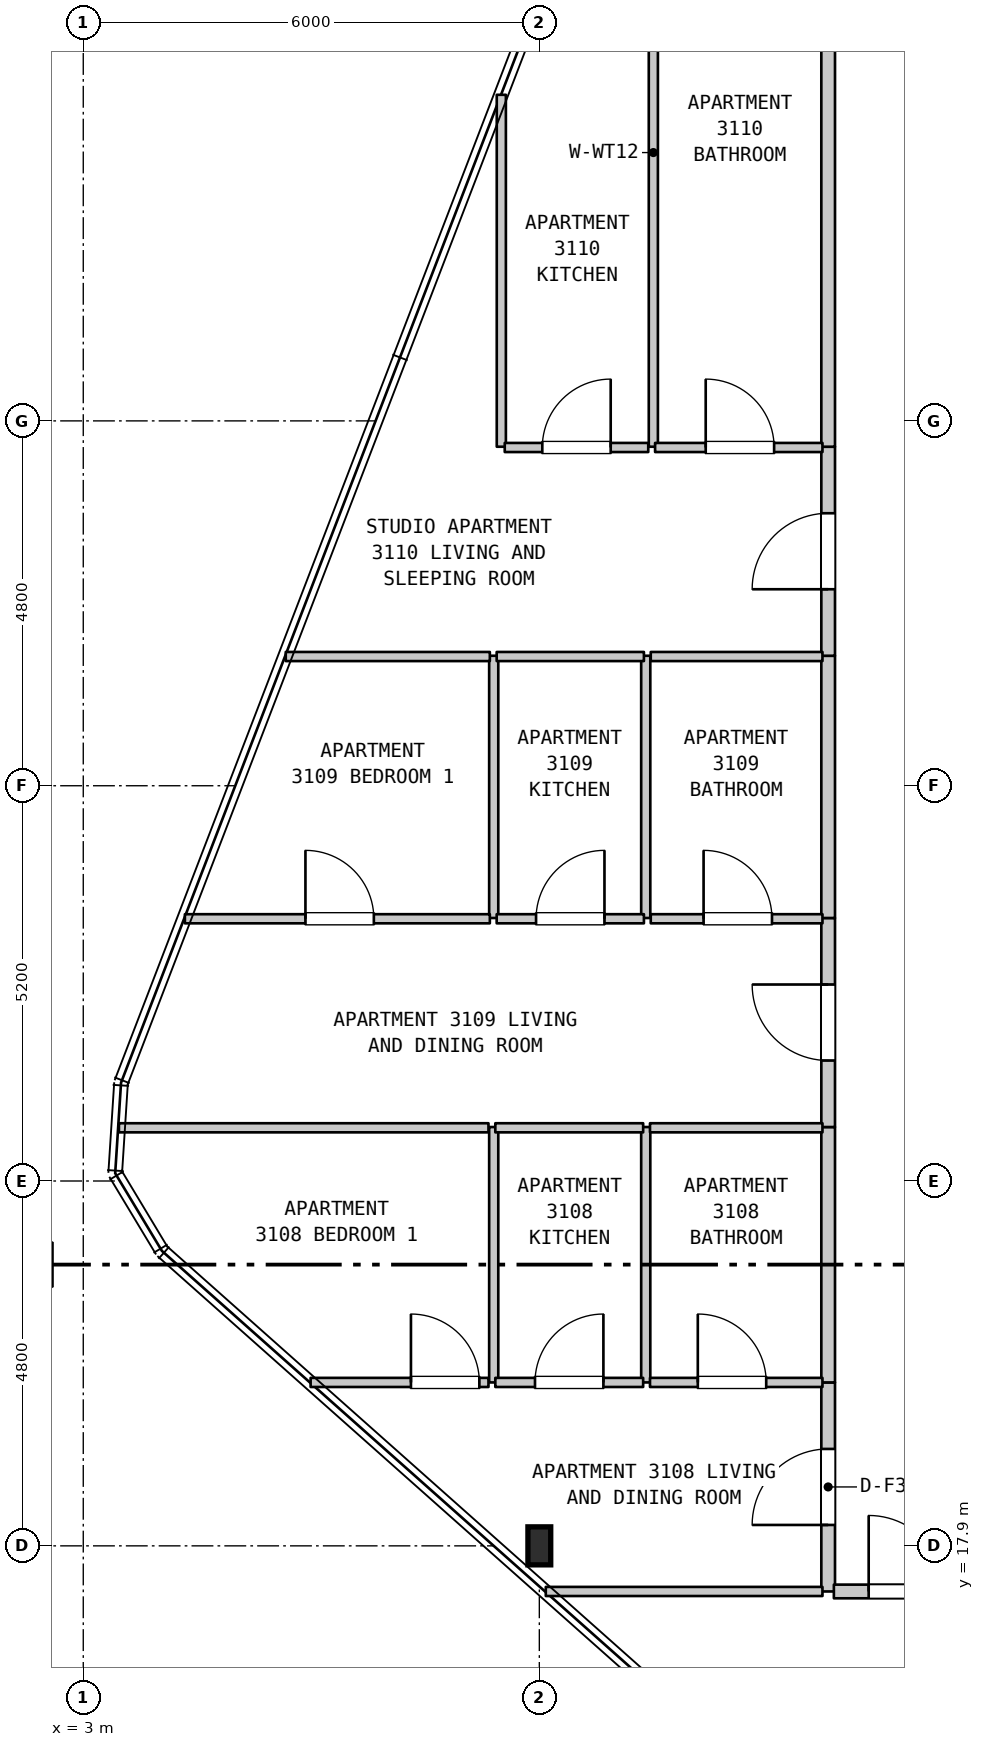
"""IFC4 building model, lengths in metres.
Left out: names, types, materials, properties, quantities, classifications, styles, units other than length and angle.
Written with IfcOpenShell. Run it as: python <this file> out.ifc"""

import sys

from ifc_helpers import new_model, si_unit, direction, frame, frame_2d, origin, origin_2d, place, context, subcontext, project, spatial, rectangle, i_section, extrude, element, fill, save


model = new_model("IFC4")
c1 = context("Model", 3, precision=1e-05, world=origin(), true_north=direction((0.0, 1.0)))
c2 = subcontext(c1, "Body", "Model", "MODEL_VIEW")
j1 = project(units=[si_unit("LENGTHUNIT", "METRE"), si_unit("PLANEANGLEUNIT", "RADIAN")], contexts=[c1])
p1 = place(None, origin())
s1 = spatial("IfcSite", under=j1, at=p1, CompositionType="ELEMENT")
p2 = place(p1, origin())
s2 = spatial("IfcBuilding", under=s1, at=p2, CompositionType="ELEMENT")
p3 = place(p2, frame((0.0, 0.0, 129.8)))
s3 = spatial("IfcBuildingStorey", under=s2, at=p3, CompositionType="ELEMENT", Elevation=129.8)
p4 = place(p3, frame((9.0, 17.9, 0.0), z_axis=(0.0, 0.0, 1.0), x_axis=(1.0, 0.0, 0.0)))
e1 = element("IfcColumn", 1, at=p4, inside=s3, PredefinedType="COLUMN", context=c2, shape_type="SweptSolid", body=[
    extrude(i_section(OverallWidth=0.3, OverallDepth=0.5, WebThickness=0.014, FlangeThickness=0.028, FilletRadius=0.027, at=origin_2d()), origin(), (0.0, 0.0, 1.0), 3.7),
])
p5 = place(p3, frame((8.4, 20.05, 0.0), z_axis=(0.0, 0.0, 1.0), x_axis=(0.0, 1.0, 0.0)))
e2 = element("IfcWall", 2, at=p5, inside=s3, PredefinedType="PARTITIONING", context=c2, shape_type="SweptSolid", body=[
    extrude(rectangle(XDim=3.36, YDim=0.12, at=frame_2d((1.68, 0.0))), origin(), (0.0, 0.0, 1.0), 3.385),
])
p6 = place(p3, frame((8.4, 26.16, 0.0), z_axis=(0.0, 0.0, 1.0), x_axis=(0.0, 1.0, 0.0)))
e3 = element("IfcWall", 3, at=p6, inside=s3, PredefinedType="PARTITIONING", context=c2, shape_type="SweptSolid", body=[
    extrude(rectangle(XDim=3.45, YDim=0.12, at=frame_2d((1.725, 0.0))), origin(), (0.0, 0.0, 1.0), 3.385),
])
p7 = place(p3, frame((8.5, 32.36, 0.0), z_axis=(0.0, 0.0, 1.0), x_axis=(0.0, 1.0, 0.0)))
e4 = element("IfcWall", 4, at=p7, inside=s3, PredefinedType="PARTITIONING", context=c2, shape_type="SweptSolid", body=[
    extrude(rectangle(XDim=4.63, YDim=0.12, at=frame_2d((2.315, 0.0))), origin(), (0.0, 0.0, 1.0), 3.385),
])
p8 = place(p3, frame((10.4, 20.05, 0.0), z_axis=(0.0, 0.0, 1.0), x_axis=(0.0, 1.0, 0.0)))
e5 = element("IfcWall", 5, at=p8, inside=s3, PredefinedType="PARTITIONING", context=c2, shape_type="SweptSolid", body=[
    extrude(rectangle(XDim=3.36, YDim=0.12, at=frame_2d((1.68, 0.0))), origin(), (0.0, 0.0, 1.0), 3.385),
])
p9 = place(p3, frame((10.4, 26.16, 0.0), z_axis=(0.0, 0.0, 1.0), x_axis=(0.0, 1.0, 0.0)))
e6 = element("IfcWall", 6, at=p9, inside=s3, PredefinedType="PARTITIONING", context=c2, shape_type="SweptSolid", body=[
    extrude(rectangle(XDim=3.45, YDim=0.12, at=frame_2d((1.725, 0.0))), origin(), (0.0, 0.0, 1.0), 3.385),
])
p10 = place(p3, frame((10.5, 32.36, 0.0), z_axis=(0.0, 0.0, 1.0), x_axis=(0.0, 1.0, 0.0)))
e7 = element("IfcWall", 7, at=p10, inside=s3, PredefinedType="PARTITIONING", context=c2, shape_type="SweptSolid", body=[
    extrude(rectangle(XDim=7.74, YDim=0.12, at=frame_2d((3.87, 0.0))), origin(), (0.0, 0.0, 1.0), 3.385),
])
p11 = place(p3, frame((12.8, 17.3, 0.0), z_axis=(0.0, 0.0, 1.0), x_axis=(0.0, 1.0, 0.0)))
e8 = element("IfcWall", 8, at=p11, inside=s3, PredefinedType="STANDARD", context=c2, shape_type="SweptSolid", body=[
    extrude(rectangle(XDim=2.75, YDim=0.18, at=frame_2d((1.375, 0.0))), origin(), (0.0, 0.0, 1.0), 3.385),
])
p12 = place(p11, frame((0.875, 0.0, 0.0)))
e9 = element("IfcOpeningElement", 9, at=p12, cuts=e8, PredefinedType="OPENING", context=c2, shape_type="SweptSolid", body=[
    extrude(rectangle(XDim=1.0, YDim=2.15, at=frame_2d((0.5, 1.075))), frame((0.0, 0.1, 0.0), z_axis=(0.0, -1.0, 0.0), x_axis=(1.0, 0.0, 0.0)), (0.0, 0.0, 1.0), 0.2),
])
p13 = place(p3, frame((12.8, 20.05, 0.0), z_axis=(0.0, 0.0, 1.0), x_axis=(0.0, 1.0, 0.0)))
e10 = element("IfcWall", 10, at=p13, inside=s3, PredefinedType="STANDARD", context=c2, shape_type="SweptSolid", body=[
    extrude(rectangle(XDim=3.36, YDim=0.18, at=frame_2d((1.68, 0.0))), origin(), (0.0, 0.0, 1.0), 3.385),
])
p14 = place(p3, frame((12.8, 23.41, 0.0), z_axis=(0.0, 0.0, 1.0), x_axis=(0.0, 1.0, 0.0)))
e11 = element("IfcWall", 11, at=p14, inside=s3, PredefinedType="STANDARD", context=c2, shape_type="SweptSolid", body=[
    extrude(rectangle(XDim=2.75, YDim=0.18, at=frame_2d((1.375, 0.0))), origin(), (0.0, 0.0, 1.0), 3.385),
])
p15 = place(p14, frame((0.875, 0.0, 0.0)))
e12 = element("IfcOpeningElement", 12, at=p15, cuts=e11, PredefinedType="OPENING", context=c2, shape_type="SweptSolid", body=[
    extrude(rectangle(XDim=1.0, YDim=2.15, at=frame_2d((0.5, 1.075))), frame((0.0, 0.1, 0.0), z_axis=(0.0, -1.0, 0.0), x_axis=(1.0, 0.0, 0.0)), (0.0, 0.0, 1.0), 0.2),
])
p16 = place(p3, frame((12.8, 26.16, 0.0), z_axis=(0.0, 0.0, 1.0), x_axis=(0.0, 1.0, 0.0)))
e13 = element("IfcWall", 13, at=p16, inside=s3, PredefinedType="STANDARD", context=c2, shape_type="SweptSolid", body=[
    extrude(rectangle(XDim=3.45, YDim=0.18, at=frame_2d((1.725, 0.0))), origin(), (0.0, 0.0, 1.0), 3.385),
])
p17 = place(p3, frame((12.8, 29.61, 0.0), z_axis=(0.0, 0.0, 1.0), x_axis=(0.0, 1.0, 0.0)))
e14 = element("IfcWall", 14, at=p17, inside=s3, PredefinedType="STANDARD", context=c2, shape_type="SweptSolid", body=[
    extrude(rectangle(XDim=2.75, YDim=0.18, at=frame_2d((1.375, 0.0))), origin(), (0.0, 0.0, 1.0), 3.385),
])
p18 = place(p17, frame((0.875, 0.0, 0.0)))
e15 = element("IfcOpeningElement", 15, at=p18, cuts=e14, PredefinedType="OPENING", context=c2, shape_type="SweptSolid", body=[
    extrude(rectangle(XDim=1.0, YDim=2.15, at=frame_2d((0.5, 1.075))), frame((0.0, 0.1, 0.0), z_axis=(0.0, -1.0, 0.0), x_axis=(1.0, 0.0, 0.0)), (0.0, 0.0, 1.0), 0.2),
])
p19 = place(p3, frame((12.8, 32.36, 0.0), z_axis=(0.0, 0.0, 1.0), x_axis=(0.0, 1.0, 0.0)))
e16 = element("IfcWall", 16, at=p19, inside=s3, PredefinedType="STANDARD", context=c2, shape_type="SweptSolid", body=[
    extrude(rectangle(XDim=7.74, YDim=0.18, at=frame_2d((3.87, 0.0))), origin(), (0.0, 0.0, 1.0), 3.385),
])
p20 = place(p3, frame((9.085, 17.3, 0.0), z_axis=(0.0, 0.0, 1.0), x_axis=(1.0, 0.0, 0.0)))
e17 = element("IfcWall", 17, at=p20, inside=s3, PredefinedType="PARTITIONING", context=c2, shape_type="SweptSolid", body=[
    extrude(rectangle(XDim=3.64, YDim=0.12, at=frame_2d((1.82, 0.0))), origin(), (0.0, 0.0, 1.0), 3.385),
])
p21 = place(p3, frame((12.875, 17.3, 0.0), z_axis=(0.0, 0.0, 1.0), x_axis=(1.0, 0.0, 0.0)))
e18 = element("IfcWall", 18, at=p21, inside=s3, PredefinedType="STANDARD", context=c2, shape_type="SweptSolid", body=[
    extrude(rectangle(XDim=3.78, YDim=0.18, at=frame_2d((1.89, 0.0))), origin(), (0.0, 0.0, 1.0), 3.385),
])
p22 = place(p21, frame((0.458, 0.0, 0.0)))
e19 = element("IfcOpeningElement", 19, at=p22, cuts=e18, PredefinedType="OPENING", context=c2, shape_type="SweptSolid", body=[
    extrude(rectangle(XDim=1.0, YDim=2.15, at=frame_2d((0.5, 1.075))), frame((0.0, 0.1, 0.0), z_axis=(0.0, -1.0, 0.0), x_axis=(1.0, 0.0, 0.0)), (0.0, 0.0, 1.0), 0.2),
])
p23 = place(p3, frame((5.991, 20.05, 0.0), z_axis=(0.0, 0.0, 1.0), x_axis=(1.0, 0.0, 0.0)))
e20 = element("IfcWall", 20, at=p23, inside=s3, PredefinedType="PARTITIONING", context=c2, shape_type="SweptSolid", body=[
    extrude(rectangle(XDim=2.34, YDim=0.12, at=frame_2d((1.17, 0.0))), origin(), (0.0, 0.0, 1.0), 3.385),
])
p24 = place(p23, frame((1.32, 0.0, 0.0)))
e21 = element("IfcOpeningElement", 21, at=p24, cuts=e20, PredefinedType="OPENING", context=c2, shape_type="SweptSolid", body=[
    extrude(rectangle(XDim=0.9, YDim=2.15, at=frame_2d((0.45, 1.075))), frame((0.0, 0.07, 0.0), z_axis=(0.0, -1.0, 0.0), x_axis=(1.0, 0.0, 0.0)), (0.0, 0.0, 1.0), 0.14),
])
p25 = place(p3, frame((8.421, 20.05, 0.0), z_axis=(0.0, 0.0, 1.0), x_axis=(1.0, 0.0, 0.0)))
e22 = element("IfcWall", 22, at=p25, inside=s3, PredefinedType="PARTITIONING", context=c2, shape_type="SweptSolid", body=[
    extrude(rectangle(XDim=1.945, YDim=0.12, at=frame_2d((0.973, 0.0))), origin(), (0.0, 0.0, 1.0), 3.385),
])
p26 = place(p25, frame((0.522, 0.0, 0.0)))
e23 = element("IfcOpeningElement", 23, at=p26, cuts=e22, PredefinedType="OPENING", context=c2, shape_type="SweptSolid", body=[
    extrude(rectangle(XDim=0.9, YDim=2.15, at=frame_2d((0.45, 1.075))), frame((0.0, 0.07, 0.0), z_axis=(0.0, -1.0, 0.0), x_axis=(1.0, 0.0, 0.0)), (0.0, 0.0, 1.0), 0.14),
])
p27 = place(p3, frame((10.456, 20.05, 0.0), z_axis=(0.0, 0.0, 1.0), x_axis=(1.0, 0.0, 0.0)))
e24 = element("IfcWall", 24, at=p27, inside=s3, PredefinedType="PARTITIONING", context=c2, shape_type="SweptSolid", body=[
    extrude(rectangle(XDim=2.269, YDim=0.12, at=frame_2d((1.135, 0.0))), origin(), (0.0, 0.0, 1.0), 3.385),
])
p28 = place(p27, frame((0.629, 0.0, 0.0)))
e25 = element("IfcOpeningElement", 25, at=p28, cuts=e24, PredefinedType="OPENING", context=c2, shape_type="SweptSolid", body=[
    extrude(rectangle(XDim=0.9, YDim=2.1, at=frame_2d((0.45, 1.05))), frame((0.0, 0.07, 0.0), z_axis=(0.0, -1.0, 0.0), x_axis=(1.0, 0.0, 0.0)), (0.0, 0.0, 1.0), 0.14),
])
p29 = place(p3, frame((3.469, 23.4, 0.0), z_axis=(0.0, 0.0, 1.0), x_axis=(1.0, 0.0, 0.0)))
e26 = element("IfcWall", 26, at=p29, inside=s3, PredefinedType="PARTITIONING", context=c2, shape_type="SweptSolid", body=[
    extrude(rectangle(XDim=4.862, YDim=0.12, at=frame_2d((2.431, 0.0))), origin(), (0.0, 0.0, 1.0), 3.385),
])
p30 = place(p3, frame((8.421, 23.4, 0.0), z_axis=(0.0, 0.0, 1.0), x_axis=(1.0, 0.0, 0.0)))
e27 = element("IfcWall", 27, at=p30, inside=s3, PredefinedType="PARTITIONING", context=c2, shape_type="SweptSolid", body=[
    extrude(rectangle(XDim=1.945, YDim=0.12, at=frame_2d((0.973, 0.0))), origin(), (0.0, 0.0, 1.0), 3.385),
])
p31 = place(p3, frame((10.456, 23.4, 0.0), z_axis=(0.0, 0.0, 1.0), x_axis=(1.0, 0.0, 0.0)))
e28 = element("IfcWall", 28, at=p31, inside=s3, PredefinedType="PARTITIONING", context=c2, shape_type="SweptSolid", body=[
    extrude(rectangle(XDim=2.269, YDim=0.12, at=frame_2d((1.135, 0.0))), origin(), (0.0, 0.0, 1.0), 3.385),
])
p32 = place(p3, frame((4.337, 26.15, 0.0), z_axis=(0.0, 0.0, 1.0), x_axis=(1.0, 0.0, 0.0)))
e29 = element("IfcWall", 29, at=p32, inside=s3, PredefinedType="PARTITIONING", context=c2, shape_type="SweptSolid", body=[
    extrude(rectangle(XDim=4.012, YDim=0.12, at=frame_2d((2.006, 0.0))), origin(), (0.0, 0.0, 1.0), 3.385),
])
p33 = place(p32, frame((1.586, 0.0, 0.0)))
e30 = element("IfcOpeningElement", 30, at=p33, cuts=e29, PredefinedType="OPENING", context=c2, shape_type="SweptSolid", body=[
    extrude(rectangle(XDim=0.9, YDim=2.15, at=frame_2d((0.45, 1.075))), frame((0.0, 0.07, 0.0), z_axis=(0.0, -1.0, 0.0), x_axis=(1.0, 0.0, 0.0)), (0.0, 0.0, 1.0), 0.14),
])
p34 = place(p3, frame((8.439, 26.15, 0.0), z_axis=(0.0, 0.0, 1.0), x_axis=(1.0, 0.0, 0.0)))
e31 = element("IfcWall", 31, at=p34, inside=s3, PredefinedType="PARTITIONING", context=c2, shape_type="SweptSolid", body=[
    extrude(rectangle(XDim=1.937, YDim=0.12, at=frame_2d((0.969, 0.0))), origin(), (0.0, 0.0, 1.0), 3.385),
])
p35 = place(p34, frame((0.518, 0.0, 0.0)))
e32 = element("IfcOpeningElement", 32, at=p35, cuts=e31, PredefinedType="OPENING", context=c2, shape_type="SweptSolid", body=[
    extrude(rectangle(XDim=0.9, YDim=2.15, at=frame_2d((0.45, 1.075))), frame((0.0, 0.07, 0.0), z_axis=(0.0, -1.0, 0.0), x_axis=(1.0, 0.0, 0.0)), (0.0, 0.0, 1.0), 0.14),
])
p36 = place(p3, frame((10.466, 26.15, 0.0), z_axis=(0.0, 0.0, 1.0), x_axis=(1.0, 0.0, 0.0)))
e33 = element("IfcWall", 33, at=p36, inside=s3, PredefinedType="PARTITIONING", context=c2, shape_type="SweptSolid", body=[
    extrude(rectangle(XDim=2.259, YDim=0.12, at=frame_2d((1.129, 0.0))), origin(), (0.0, 0.0, 1.0), 3.385),
])
p37 = place(p36, frame((0.695, 0.0, 0.0)))
e34 = element("IfcOpeningElement", 34, at=p37, cuts=e33, PredefinedType="OPENING", context=c2, shape_type="SweptSolid", body=[
    extrude(rectangle(XDim=0.9, YDim=2.1, at=frame_2d((0.45, 1.05))), frame((0.0, 0.07, 0.0), z_axis=(0.0, -1.0, 0.0), x_axis=(1.0, 0.0, 0.0)), (0.0, 0.0, 1.0), 0.14),
])
p38 = place(p3, frame((5.664, 29.6, 0.0), z_axis=(0.0, 0.0, 1.0), x_axis=(1.0, 0.0, 0.0)))
e35 = element("IfcWall", 35, at=p38, inside=s3, PredefinedType="PARTITIONING", context=c2, shape_type="SweptSolid", body=[
    extrude(rectangle(XDim=2.685, YDim=0.12, at=frame_2d((1.343, 0.0))), origin(), (0.0, 0.0, 1.0), 3.385),
])
p39 = place(p3, frame((8.439, 29.6, 0.0), z_axis=(0.0, 0.0, 1.0), x_axis=(1.0, 0.0, 0.0)))
e36 = element("IfcWall", 36, at=p39, inside=s3, PredefinedType="PARTITIONING", context=c2, shape_type="SweptSolid", body=[
    extrude(rectangle(XDim=1.937, YDim=0.12, at=frame_2d((0.969, 0.0))), origin(), (0.0, 0.0, 1.0), 3.385),
])
p40 = place(p3, frame((10.466, 29.6, 0.0), z_axis=(0.0, 0.0, 1.0), x_axis=(1.0, 0.0, 0.0)))
e37 = element("IfcWall", 37, at=p40, inside=s3, PredefinedType="PARTITIONING", context=c2, shape_type="SweptSolid", body=[
    extrude(rectangle(XDim=2.259, YDim=0.12, at=frame_2d((1.129, 0.0))), origin(), (0.0, 0.0, 1.0), 3.385),
])
p41 = place(p3, frame((8.545, 32.35, 0.0), z_axis=(0.0, 0.0, 1.0), x_axis=(1.0, 0.0, 0.0)))
e38 = element("IfcWall", 38, at=p41, inside=s3, PredefinedType="PARTITIONING", context=c2, shape_type="SweptSolid", body=[
    extrude(rectangle(XDim=1.888, YDim=0.12, at=frame_2d((0.944, 0.0))), origin(), (0.0, 0.0, 1.0), 3.385),
])
p42 = place(p41, frame((0.494, 0.0, 0.0)))
e39 = element("IfcOpeningElement", 39, at=p42, cuts=e38, PredefinedType="OPENING", context=c2, shape_type="SweptSolid", body=[
    extrude(rectangle(XDim=0.9, YDim=2.15, at=frame_2d((0.45, 1.075))), frame((0.0, 0.07, 0.0), z_axis=(0.0, -1.0, 0.0), x_axis=(1.0, 0.0, 0.0)), (0.0, 0.0, 1.0), 0.14),
])
p43 = place(p3, frame((10.523, 32.35, 0.0), z_axis=(0.0, 0.0, 1.0), x_axis=(1.0, 0.0, 0.0)))
e40 = element("IfcWall", 40, at=p43, inside=s3, PredefinedType="PARTITIONING", context=c2, shape_type="SweptSolid", body=[
    extrude(rectangle(XDim=2.202, YDim=0.12, at=frame_2d((1.101, 0.0))), origin(), (0.0, 0.0, 1.0), 3.385),
])
p44 = place(p43, frame((0.666, 0.0, 0.0)))
e41 = element("IfcOpeningElement", 41, at=p44, cuts=e40, PredefinedType="OPENING", context=c2, shape_type="SweptSolid", body=[
    extrude(rectangle(XDim=0.9, YDim=2.1, at=frame_2d((0.45, 1.05))), frame((0.0, 0.07, 0.0), z_axis=(0.0, -1.0, 0.0), x_axis=(1.0, 0.0, 0.0)), (0.0, 0.0, 1.0), 0.14),
])
p45 = place(p12, origin())
e42 = element("IfcDoor", 42, at=p45, inside=s3, OperationType="SINGLE_SWING_LEFT", PredefinedType="DOOR", context=c2, shape_type="SweptSolid", body=[
    extrude(rectangle(XDim=1.0, YDim=2.15, at=frame_2d((0.5, 1.075))), frame((0.0, 0.025, 0.0), z_axis=(0.0, -1.0, 0.0), x_axis=(1.0, 0.0, 0.0)), (0.0, 0.0, 1.0), 0.05),
])
fill(e9, e42)
p46 = place(p15, origin())
e43 = element("IfcDoor", 43, at=p46, inside=s3, OperationType="SINGLE_SWING_RIGHT", PredefinedType="DOOR", context=c2, shape_type="SweptSolid", body=[
    extrude(rectangle(XDim=1.0, YDim=2.15, at=frame_2d((0.5, 1.075))), frame((0.0, 0.025, 0.0), z_axis=(0.0, -1.0, 0.0), x_axis=(1.0, 0.0, 0.0)), (0.0, 0.0, 1.0), 0.05),
])
fill(e12, e43)
p47 = place(p18, origin())
e44 = element("IfcDoor", 44, at=p47, inside=s3, OperationType="SINGLE_SWING_LEFT", PredefinedType="DOOR", context=c2, shape_type="SweptSolid", body=[
    extrude(rectangle(XDim=1.0, YDim=2.15, at=frame_2d((0.5, 1.075))), frame((0.0, 0.025, 0.0), z_axis=(0.0, -1.0, 0.0), x_axis=(1.0, 0.0, 0.0)), (0.0, 0.0, 1.0), 0.05),
])
fill(e15, e44)
p48 = place(p22, origin())
e45 = element("IfcDoor", 45, at=p48, inside=s3, OperationType="SINGLE_SWING_LEFT", PredefinedType="DOOR", context=c2, shape_type="SweptSolid", body=[
    extrude(rectangle(XDim=1.0, YDim=2.15, at=frame_2d((0.5, 1.075))), frame((0.0, 0.025, 0.0), z_axis=(0.0, -1.0, 0.0), x_axis=(1.0, 0.0, 0.0)), (0.0, 0.0, 1.0), 0.05),
])
fill(e19, e45)
p49 = place(p24, origin())
e46 = element("IfcDoor", 46, at=p49, inside=s3, OperationType="SINGLE_SWING_LEFT", PredefinedType="DOOR", context=c2, shape_type="SweptSolid", body=[
    extrude(rectangle(XDim=0.9, YDim=2.15, at=frame_2d((0.45, 1.075))), frame((0.0, 0.025, 0.0), z_axis=(0.0, -1.0, 0.0), x_axis=(1.0, 0.0, 0.0)), (0.0, 0.0, 1.0), 0.05),
])
fill(e21, e46)
p50 = place(p26, origin())
e47 = element("IfcDoor", 47, at=p50, inside=s3, OperationType="SINGLE_SWING_RIGHT", PredefinedType="DOOR", context=c2, shape_type="SweptSolid", body=[
    extrude(rectangle(XDim=0.9, YDim=2.15, at=frame_2d((0.45, 1.075))), frame((0.0, 0.025, 0.0), z_axis=(0.0, -1.0, 0.0), x_axis=(1.0, 0.0, 0.0)), (0.0, 0.0, 1.0), 0.05),
])
fill(e23, e47)
p51 = place(p28, origin())
e48 = element("IfcDoor", 48, at=p51, inside=s3, OperationType="SINGLE_SWING_LEFT", PredefinedType="DOOR", context=c2, shape_type="SweptSolid", body=[
    extrude(rectangle(XDim=0.9, YDim=2.1, at=frame_2d((0.45, 1.05))), frame((0.0, 0.025, 0.0), z_axis=(0.0, -1.0, 0.0), x_axis=(1.0, 0.0, 0.0)), (0.0, 0.0, 1.0), 0.05),
])
fill(e25, e48)
p52 = place(p33, origin())
e49 = element("IfcDoor", 49, at=p52, inside=s3, OperationType="SINGLE_SWING_LEFT", PredefinedType="DOOR", context=c2, shape_type="SweptSolid", body=[
    extrude(rectangle(XDim=0.9, YDim=2.15, at=frame_2d((0.45, 1.075))), frame((0.0, 0.025, 0.0), z_axis=(0.0, -1.0, 0.0), x_axis=(1.0, 0.0, 0.0)), (0.0, 0.0, 1.0), 0.05),
])
fill(e30, e49)
p53 = place(p35, origin())
e50 = element("IfcDoor", 50, at=p53, inside=s3, OperationType="SINGLE_SWING_RIGHT", PredefinedType="DOOR", context=c2, shape_type="SweptSolid", body=[
    extrude(rectangle(XDim=0.9, YDim=2.15, at=frame_2d((0.45, 1.075))), frame((0.0, 0.025, 0.0), z_axis=(0.0, -1.0, 0.0), x_axis=(1.0, 0.0, 0.0)), (0.0, 0.0, 1.0), 0.05),
])
fill(e32, e50)
p54 = place(p37, origin())
e51 = element("IfcDoor", 51, at=p54, inside=s3, OperationType="SINGLE_SWING_LEFT", PredefinedType="DOOR", context=c2, shape_type="SweptSolid", body=[
    extrude(rectangle(XDim=0.9, YDim=2.1, at=frame_2d((0.45, 1.05))), frame((0.0, 0.025, 0.0), z_axis=(0.0, -1.0, 0.0), x_axis=(1.0, 0.0, 0.0)), (0.0, 0.0, 1.0), 0.05),
])
fill(e34, e51)
p55 = place(p42, origin())
e52 = element("IfcDoor", 52, at=p55, inside=s3, OperationType="SINGLE_SWING_RIGHT", PredefinedType="DOOR", context=c2, shape_type="SweptSolid", body=[
    extrude(rectangle(XDim=0.9, YDim=2.15, at=frame_2d((0.45, 1.075))), frame((0.0, 0.025, 0.0), z_axis=(0.0, -1.0, 0.0), x_axis=(1.0, 0.0, 0.0)), (0.0, 0.0, 1.0), 0.05),
])
fill(e39, e52)
p56 = place(p44, origin())
e53 = element("IfcDoor", 53, at=p56, inside=s3, OperationType="SINGLE_SWING_LEFT", PredefinedType="DOOR", context=c2, shape_type="SweptSolid", body=[
    extrude(rectangle(XDim=0.9, YDim=2.1, at=frame_2d((0.45, 1.05))), frame((0.0, 0.025, 0.0), z_axis=(0.0, -1.0, 0.0), x_axis=(1.0, 0.0, 0.0)), (0.0, 0.0, 1.0), 0.05),
])
fill(e41, e53)
save(model, sys.argv[1])
